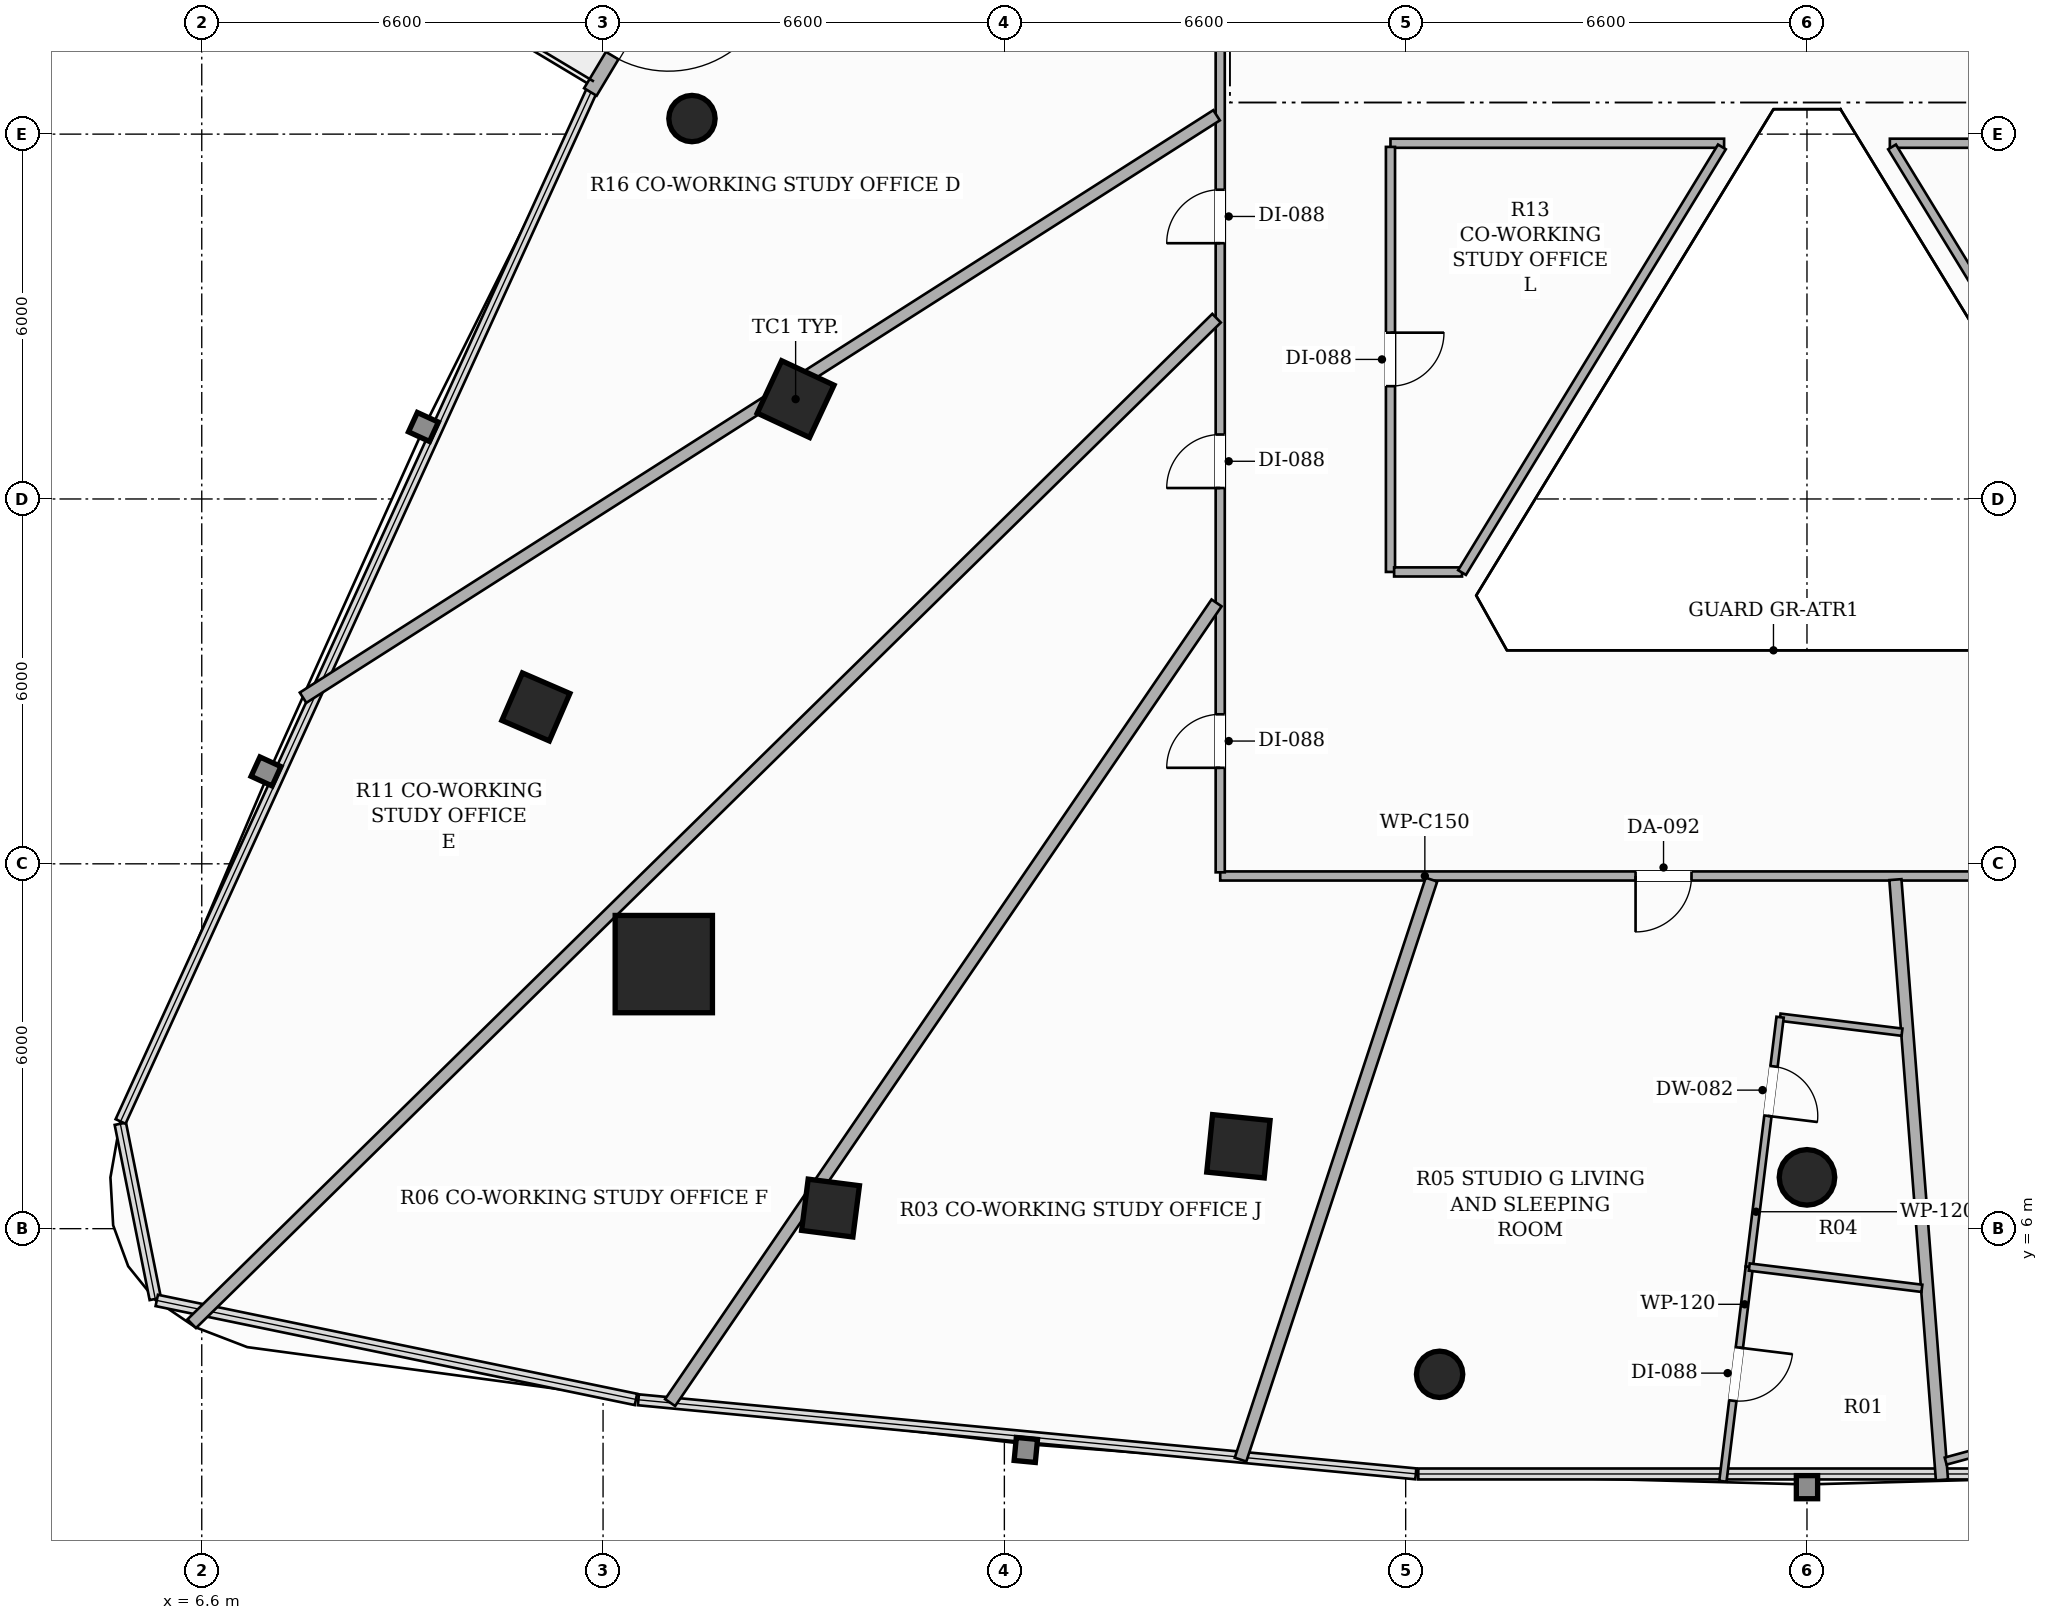
"""IFC4 building model, lengths in metres.
Left out: names, types, materials, properties, quantities, classifications, styles, units other than length and angle.
Written with IfcOpenShell. Run it as: python <this file> out.ifc"""

import sys

from ifc_helpers import new_model, si_unit, direction, frame, frame_2d, origin, origin_2d, place, context, subcontext, project, spatial, rectangle, hollow_rectangle, hollow_circle, extrude, element, fill, save


model = new_model("IFC4")
c1 = context("Model", 3, precision=1e-05, world=origin(), true_north=direction((0.0, 1.0)))
c2 = subcontext(c1, "Body", "Model", "MODEL_VIEW")
j1 = project(units=[si_unit("LENGTHUNIT", "METRE"), si_unit("PLANEANGLEUNIT", "RADIAN")], contexts=[c1])
p1 = place(None, origin())
s1 = spatial("IfcSite", under=j1, at=p1, CompositionType="ELEMENT")
p2 = place(p1, origin())
s2 = spatial("IfcBuilding", under=s1, at=p2, CompositionType="ELEMENT")
p3 = place(p2, frame((0.0, 0.0, 70.85)))
s3 = spatial("IfcBuildingStorey", under=s2, at=p3, CompositionType="ELEMENT", Elevation=70.85)
p4 = place(p3, frame((14.199, 10.351, 0.0), z_axis=(0.0, 0.0, 1.0), x_axis=(1.0, 0.0, 0.0)))
e1 = element("IfcColumn", 1, at=p4, inside=s3, PredefinedType="COLUMN", context=c2, shape_type="SweptSolid", body=[
    extrude(hollow_rectangle(XDim=1.6, YDim=1.6, WallThickness=0.05, at=origin_2d()), origin(), (0.0, 0.0, 1.0), 3.3),
])
for number, where, z_axis, x_axis in (
    (2, (16.367, 19.642, 0.0), (0.0, 0.0, 1.0), (0.423, 0.906, 0.0)),
    (3, (23.649, 7.355, 0.0), (0.0, 0.0, 1.0), (-0.995, 0.101, 0.0)),
):
    element("IfcColumn", number, at=place(p3, frame(where, z_axis=z_axis, x_axis=x_axis)), inside=s3, PredefinedType="COLUMN", context=c2, shape_type="SweptSolid", body=[
        extrude(hollow_rectangle(XDim=0.95, YDim=0.95, WallThickness=0.032, at=origin_2d()), origin(), (0.0, 0.0, 1.0), 3.3),
    ])
p5 = place(p3, frame((33.0, 6.844, 0.0), z_axis=(0.0, 0.0, 1.0), x_axis=(1.0, 0.0, 0.0)))
e4 = element("IfcColumn", 4, at=p5, inside=s3, PredefinedType="COLUMN", context=c2, shape_type="SweptSolid", body=[
    extrude(hollow_circle(Radius=0.457, WallThickness=0.025, at=origin_2d()), origin(), (0.0, 0.0, 1.0), 3.3),
])
for number, where, z_axis, x_axis in (
    (5, (12.095, 14.58, 0.0), (0.0, 0.0, 1.0), (0.397, 0.918, 0.0)),
    (6, (16.941, 6.339, 0.0), (0.0, 0.0, 1.0), (-0.992, 0.127, 0.0)),
):
    element("IfcColumn", number, at=place(p3, frame(where, z_axis=z_axis, x_axis=x_axis)), inside=s3, PredefinedType="COLUMN", context=c2, shape_type="SweptSolid", body=[
        extrude(hollow_rectangle(XDim=0.85, YDim=0.85, WallThickness=0.028, at=origin_2d()), origin(), (0.0, 0.0, 1.0), 3.3),
    ])
for number, where, z_axis, x_axis in (
    (7, (14.662, 24.256, 0.0), (0.0, 0.0, 1.0), (1.0, 0.0, 0.0)),
    (8, (26.958, 3.605, 0.0), (0.0, 0.0, 1.0), (1.0, 0.0, 0.0)),
):
    element("IfcColumn", number, at=place(p3, frame(where, z_axis=z_axis, x_axis=x_axis)), inside=s3, PredefinedType="COLUMN", context=c2, shape_type="SweptSolid", body=[
        extrude(hollow_circle(Radius=0.381, WallThickness=0.022, at=origin_2d()), origin(), (0.0, 0.0, 1.0), 3.3),
    ])
p6 = place(p3, frame((19.473, 35.501, 0.0), z_axis=(0.0, 0.0, 1.0), x_axis=(-0.514333361126, -0.857590341382, 0.0)))
e9 = element("IfcWall", 9, at=p6, inside=s3, PredefinedType="SOLIDWALL", context=c2, shape_type="SweptSolid", body=[
    extrude(rectangle(XDim=12.603, YDim=0.24, at=frame_2d((6.301, 0.0))), origin(), (0.0, 0.0, 1.0), 2.624),
])
p7 = place(p6, frame((10.105, 0.0, 0.0)))
e10 = element("IfcOpeningElement", 10, at=p7, cuts=e9, PredefinedType="OPENING", context=c2, shape_type="SweptSolid", body=[
    extrude(rectangle(XDim=1.8, YDim=2.2, at=frame_2d((0.9, 1.1))), frame((0.0, 0.13, 0.0), z_axis=(0.0, -1.0, 0.0), x_axis=(1.0, 0.0, 0.0)), (0.0, 0.0, 1.0), 0.26),
])
p8 = place(p3, frame((42.59, 11.8, 0.0), z_axis=(0.0, 0.0, 1.0), x_axis=(-1.0, 0.0, 0.0)))
e11 = element("IfcWall", 11, at=p8, inside=s3, PredefinedType="PARTITIONING", context=c2, shape_type="SweptSolid", body=[
    extrude(rectangle(XDim=19.24, YDim=0.15, at=frame_2d((9.62, 0.0))), origin(), (0.0, 0.0, 1.0), 2.669),
])
p9 = place(p8, frame((11.489, 0.0, 0.0)))
e12 = element("IfcOpeningElement", 12, at=p9, cuts=e11, PredefinedType="OPENING", context=c2, shape_type="SweptSolid", body=[
    extrude(rectangle(XDim=0.92, YDim=2.15, at=frame_2d((0.46, 1.075))), frame((0.0, 0.085, 0.0), z_axis=(0.0, -1.0, 0.0), x_axis=(1.0, 0.0, 0.0)), (0.0, 0.0, 1.0), 0.17),
])
p10 = place(p8, frame((3.787, 0.0, 0.0)))
e13 = element("IfcOpeningElement", 13, at=p10, cuts=e11, PredefinedType="OPENING", context=c2, shape_type="SweptSolid", body=[
    extrude(rectangle(XDim=0.92, YDim=2.15, at=frame_2d((0.46, 1.075))), frame((0.0, 0.085, 0.0), z_axis=(0.0, -1.0, 0.0), x_axis=(1.0, 0.0, 0.0)), (0.0, 0.0, 1.0), 0.17),
])
p11 = place(p3, frame((23.35, 11.86, 0.0), z_axis=(0.0, 0.0, 1.0), x_axis=(0.0, 1.0, 0.0)))
e14 = element("IfcWall", 14, at=p11, inside=s3, PredefinedType="PARTITIONING", context=c2, shape_type="SweptSolid", body=[
    extrude(rectangle(XDim=25.04, YDim=0.15, at=frame_2d((12.52, 0.0))), origin(), (0.0, 0.0, 1.0), 2.413),
])
p12 = place(p11, frame((18.154, 0.0, 0.0)))
e15 = element("IfcOpeningElement", 15, at=p12, cuts=e14, PredefinedType="OPENING", context=c2, shape_type="SweptSolid", body=[
    extrude(rectangle(XDim=0.88, YDim=2.1, at=frame_2d((0.44, 1.05))), frame((0.0, 0.085, 0.0), z_axis=(0.0, -1.0, 0.0), x_axis=(1.0, 0.0, 0.0)), (0.0, 0.0, 1.0), 0.17),
])
p13 = place(p11, frame((10.346, 0.0, 0.0)))
e16 = element("IfcOpeningElement", 16, at=p13, cuts=e14, PredefinedType="OPENING", context=c2, shape_type="SweptSolid", body=[
    extrude(rectangle(XDim=0.88, YDim=2.1, at=frame_2d((0.44, 1.05))), frame((0.0, 0.085, 0.0), z_axis=(0.0, -1.0, 0.0), x_axis=(1.0, 0.0, 0.0)), (0.0, 0.0, 1.0), 0.17),
])
p14 = place(p11, frame((6.32, 0.0, 0.0)))
e17 = element("IfcOpeningElement", 17, at=p14, cuts=e14, PredefinedType="OPENING", context=c2, shape_type="SweptSolid", body=[
    extrude(rectangle(XDim=0.88, YDim=2.1, at=frame_2d((0.44, 1.05))), frame((0.0, 0.085, 0.0), z_axis=(0.0, -1.0, 0.0), x_axis=(1.0, 0.0, 0.0)), (0.0, 0.0, 1.0), 0.17),
])
p15 = place(p11, frame((1.719, 0.0, 0.0)))
e18 = element("IfcOpeningElement", 18, at=p15, cuts=e14, PredefinedType="OPENING", context=c2, shape_type="SweptSolid", body=[
    extrude(rectangle(XDim=0.88, YDim=2.1, at=frame_2d((0.44, 1.05))), frame((0.0, 0.085, 0.0), z_axis=(0.0, -1.0, 0.0), x_axis=(1.0, 0.0, 0.0)), (0.0, 0.0, 1.0), 0.17),
])
p16 = place(p3, frame((31.637, 23.85, 0.0), z_axis=(0.0, 0.0, 1.0), x_axis=(-1.0, 0.0, 0.0)))
e19 = element("IfcWall", 19, at=p16, inside=s3, PredefinedType="PARTITIONING", context=c2, shape_type="SweptSolid", body=[
    extrude(rectangle(XDim=5.487, YDim=0.15, at=frame_2d((2.744, 0.0))), origin(), (0.0, 0.0, 1.0), 2.669),
])
p17 = place(p3, frame((26.15, 23.79, 0.0), z_axis=(0.0, 0.0, 1.0), x_axis=(0.0, -1.0, 0.0)))
e20 = element("IfcWall", 20, at=p17, inside=s3, PredefinedType="PARTITIONING", context=c2, shape_type="SweptSolid", body=[
    extrude(rectangle(XDim=6.99, YDim=0.15, at=frame_2d((3.495, 0.0))), origin(), (0.0, 0.0, 1.0), 2.669),
])
p18 = place(p17, frame((3.055, 0.0, 0.0)))
e21 = element("IfcOpeningElement", 21, at=p18, cuts=e20, PredefinedType="OPENING", context=c2, shape_type="SweptSolid", body=[
    extrude(rectangle(XDim=0.88, YDim=2.1, at=frame_2d((0.44, 1.05))), frame((0.0, 0.085, 0.0), z_axis=(0.0, -1.0, 0.0), x_axis=(1.0, 0.0, 0.0)), (0.0, 0.0, 1.0), 0.17),
])
p19 = place(p3, frame((26.21, 16.8, 0.0), z_axis=(0.0, 0.0, 1.0), x_axis=(1.0, 0.0, 0.0)))
e22 = element("IfcWall", 22, at=p19, inside=s3, PredefinedType="PARTITIONING", context=c2, shape_type="SweptSolid", body=[
    extrude(rectangle(XDim=1.117, YDim=0.15, at=frame_2d((0.559, 0.0))), origin(), (0.0, 0.0, 1.0), 3.06),
])
p20 = place(p3, frame((39.79, 23.85, 0.0), z_axis=(0.0, 0.0, 1.0), x_axis=(-1.0, 0.0, 0.0)))
e23 = element("IfcWall", 23, at=p20, inside=s3, PredefinedType="PARTITIONING", context=c2, shape_type="SweptSolid", body=[
    extrude(rectangle(XDim=5.427, YDim=0.15, at=frame_2d((2.713, 0.0))), origin(), (0.0, 0.0, 1.0), 2.669),
])
p21 = place(p3, frame((27.327, 16.79, 0.0), z_axis=(0.0, 0.0, 1.0), x_axis=(0.521129693902, 0.853477499489, 0.0)))
e24 = element("IfcWall", 24, at=p21, inside=s3, PredefinedType="PARTITIONING", context=c2, shape_type="SweptSolid", body=[
    extrude(rectangle(XDim=8.202, YDim=0.15, at=frame_2d((4.101, 0.0))), origin(), (0.0, 0.0, 1.0), 2.669),
])
p22 = place(p3, frame((34.399, 23.79, 0.0), z_axis=(0.0, 0.0, 1.0), x_axis=(0.521619930676, -0.853177969665, 0.0)))
e25 = element("IfcWall", 25, at=p22, inside=s3, PredefinedType="PARTITIONING", context=c2, shape_type="SweptSolid", body=[
    extrude(rectangle(XDim=8.194, YDim=0.15, at=frame_2d((4.097, 0.0))), origin(), (0.0, 0.0, 1.0), 2.669),
])
p23 = place(p3, frame((23.29, 24.31, 0.0), z_axis=(0.0, 0.0, 1.0), x_axis=(-0.843217726059, -0.537572196509, 0.0)))
e26 = element("IfcWall", 26, at=p23, inside=s3, PredefinedType="PARTITIONING", context=c2, shape_type="SweptSolid", body=[
    extrude(rectangle(XDim=17.817, YDim=0.2, at=frame_2d((8.909, 0.0))), origin(), (0.0, 0.0, 1.0), 2.413),
])
p24 = place(p3, frame((23.29, 20.973, 0.0), z_axis=(0.0, 0.0, 1.0), x_axis=(-0.713831483248, -0.70031750908, 0.0)))
e27 = element("IfcWall", 27, at=p24, inside=s3, PredefinedType="PARTITIONING", context=c2, shape_type="SweptSolid", body=[
    extrude(rectangle(XDim=23.612, YDim=0.2, at=frame_2d((11.806, 0.0))), origin(), (0.0, 0.0, 1.0), 2.413),
])
p25 = place(p3, frame((23.29, 16.291, 0.0), z_axis=(0.0, 0.0, 1.0), x_axis=(-0.564210182678, -0.825631194761, 0.0)))
e28 = element("IfcWall", 28, at=p25, inside=s3, PredefinedType="PARTITIONING", context=c2, shape_type="SweptSolid", body=[
    extrude(rectangle(XDim=15.928, YDim=0.2, at=frame_2d((7.964, 0.0))), origin(), (0.0, 0.0, 1.0), 2.413),
])
p26 = place(p3, frame((34.454, 11.74, 0.0), z_axis=(0.0, 0.0, 1.0), x_axis=(0.077354581403, -0.997003645297, 0.0)))
e29 = element("IfcWall", 29, at=p26, inside=s3, PredefinedType="PARTITIONING", context=c2, shape_type="SweptSolid", body=[
    extrude(rectangle(XDim=9.901, YDim=0.2, at=frame_2d((4.95, 0.0))), origin(), (0.0, 0.0, 1.0), 2.413),
])
p27 = place(p3, frame((23.684, 2.202, 0.0), z_axis=(0.0, 0.0, 1.0), x_axis=(0.31268804242, 0.949855877556, 0.0)))
e30 = element("IfcWall", 30, at=p27, inside=s3, PredefinedType="PARTITIONING", context=c2, shape_type="SweptSolid", body=[
    extrude(rectangle(XDim=10.042, YDim=0.2, at=frame_2d((5.021, 0.0))), origin(), (0.0, 0.0, 1.0), 2.413),
])
p28 = place(p3, frame((34.563, 9.231, 0.0), z_axis=(0.0, 0.0, 1.0), x_axis=(-0.992492062854, 0.122309055968, 0.0)))
e31 = element("IfcWall", 31, at=p28, inside=s3, PredefinedType="PARTITIONING", context=c2, shape_type="SweptSolid", body=[
    extrude(rectangle(XDim=2.02, YDim=0.12, at=frame_2d((1.01, 0.0))), origin(), (0.0, 0.0, 1.0), 2.669),
])
p29 = place(p3, frame((32.558, 9.478, 0.0), z_axis=(0.0, 0.0, 1.0), x_axis=(-0.122474226657, -0.992471694208, 0.0)))
e32 = element("IfcWall", 32, at=p29, inside=s3, PredefinedType="PARTITIONING", context=c2, shape_type="SweptSolid", body=[
    extrude(rectangle(XDim=4.14, YDim=0.12, at=frame_2d((2.07, 0.0))), origin(), (0.0, 0.0, 1.0), 2.413),
])
p30 = place(p29, frame((0.816, 0.0, 0.0)))
e33 = element("IfcOpeningElement", 33, at=p30, cuts=e32, PredefinedType="OPENING", context=c2, shape_type="SweptSolid", body=[
    extrude(rectangle(XDim=0.82, YDim=2.1, at=frame_2d((0.41, 1.05))), frame((0.0, 0.07, 0.0), z_axis=(0.0, -1.0, 0.0), x_axis=(1.0, 0.0, 0.0)), (0.0, 0.0, 1.0), 0.14),
])
p31 = place(p3, frame((32.051, 5.369, 0.0), z_axis=(0.0, 0.0, 1.0), x_axis=(-0.122290707402, -0.992494323854, 0.0)))
e34 = element("IfcWall", 34, at=p31, inside=s3, PredefinedType="PARTITIONING", context=c2, shape_type="SweptSolid", body=[
    extrude(rectangle(XDim=3.55, YDim=0.12, at=frame_2d((1.775, 0.0))), origin(), (0.0, 0.0, 1.0), 3.06),
])
p32 = place(p31, frame((1.335, 0.0, 0.0)))
e35 = element("IfcOpeningElement", 35, at=p32, cuts=e34, PredefinedType="OPENING", context=c2, shape_type="SweptSolid", body=[
    extrude(rectangle(XDim=0.88, YDim=2.1, at=frame_2d((0.44, 1.05))), frame((0.0, 0.07, 0.0), z_axis=(0.0, -1.0, 0.0), x_axis=(1.0, 0.0, 0.0)), (0.0, 0.0, 1.0), 0.14),
])
p33 = place(p3, frame((34.89, 5.019, 0.0), z_axis=(0.0, 0.0, 1.0), x_axis=(-0.992491734807, 0.12231171792, 0.0)))
e36 = element("IfcWall", 36, at=p33, inside=s3, PredefinedType="PARTITIONING", context=c2, shape_type="SweptSolid", body=[
    extrude(rectangle(XDim=2.86, YDim=0.12, at=frame_2d((1.43, 0.0))), origin(), (0.0, 0.0, 1.0), 3.06),
])
p34 = place(p3, frame((42.655, 4.184, 0.0), z_axis=(0.0, 0.0, 1.0), x_axis=(-0.964929508567, -0.26250913031, 0.0)))
e37 = element("IfcWall", 37, at=p34, inside=s3, PredefinedType="PARTITIONING", context=c2, shape_type="SweptSolid", body=[
    extrude(rectangle(XDim=7.642, YDim=0.12, at=frame_2d((3.821, 0.0))), origin(), (0.0, 0.0, 1.0), 2.413),
])
p35 = place(p34, frame((4.368, 0.0, 0.0)))
e38 = element("IfcOpeningElement", 38, at=p35, cuts=e37, PredefinedType="OPENING", context=c2, shape_type="SweptSolid", body=[
    extrude(rectangle(XDim=0.88, YDim=2.1, at=frame_2d((0.44, 1.05))), frame((0.0, 0.07, 0.0), z_axis=(0.0, -1.0, 0.0), x_axis=(1.0, 0.0, 0.0)), (0.0, 0.0, 1.0), 0.14),
])
p36 = place(p7, origin())
e39 = element("IfcDoor", 39, at=p36, inside=s3, OperationType="SINGLE_SWING_LEFT", PredefinedType="DOOR", context=c2, shape_type="SweptSolid", body=[
    extrude(rectangle(XDim=1.8, YDim=2.2, at=frame_2d((0.9, 1.1))), frame((0.0, 0.025, 0.0), z_axis=(0.0, -1.0, 0.0), x_axis=(1.0, 0.0, 0.0)), (0.0, 0.0, 1.0), 0.05),
])
fill(e10, e39)
p37 = place(p13, origin())
e40 = element("IfcDoor", 40, at=p37, inside=s3, OperationType="SINGLE_SWING_LEFT", PredefinedType="DOOR", context=c2, shape_type="SweptSolid", body=[
    extrude(rectangle(XDim=0.88, YDim=2.1, at=frame_2d((0.44, 1.05))), frame((0.0, 0.025, 0.0), z_axis=(0.0, -1.0, 0.0), x_axis=(1.0, 0.0, 0.0)), (0.0, 0.0, 1.0), 0.05),
])
fill(e16, e40)
p38 = place(p14, origin())
e41 = element("IfcDoor", 41, at=p38, inside=s3, OperationType="SINGLE_SWING_LEFT", PredefinedType="DOOR", context=c2, shape_type="SweptSolid", body=[
    extrude(rectangle(XDim=0.88, YDim=2.1, at=frame_2d((0.44, 1.05))), frame((0.0, 0.025, 0.0), z_axis=(0.0, -1.0, 0.0), x_axis=(1.0, 0.0, 0.0)), (0.0, 0.0, 1.0), 0.05),
])
fill(e17, e41)
p39 = place(p9, origin())
e42 = element("IfcDoor", 42, at=p39, inside=s3, OperationType="SINGLE_SWING_RIGHT", PredefinedType="DOOR", context=c2, shape_type="SweptSolid", body=[
    extrude(rectangle(XDim=0.92, YDim=2.15, at=frame_2d((0.46, 1.075))), frame((0.0, 0.025, 0.0), z_axis=(0.0, -1.0, 0.0), x_axis=(1.0, 0.0, 0.0)), (0.0, 0.0, 1.0), 0.05),
])
fill(e12, e42)
p40 = place(p30, origin())
e43 = element("IfcDoor", 43, at=p40, inside=s3, OperationType="SINGLE_SWING_RIGHT", PredefinedType="DOOR", context=c2, shape_type="SweptSolid", body=[
    extrude(rectangle(XDim=0.82, YDim=2.1, at=frame_2d((0.41, 1.05))), frame((0.0, 0.025, 0.0), z_axis=(0.0, -1.0, 0.0), x_axis=(1.0, 0.0, 0.0)), (0.0, 0.0, 1.0), 0.05),
])
fill(e33, e43)
p41 = place(p32, origin())
e44 = element("IfcDoor", 44, at=p41, inside=s3, OperationType="SINGLE_SWING_LEFT", PredefinedType="DOOR", context=c2, shape_type="SweptSolid", body=[
    extrude(rectangle(XDim=0.88, YDim=2.1, at=frame_2d((0.44, 1.05))), frame((0.0, 0.025, 0.0), z_axis=(0.0, -1.0, 0.0), x_axis=(1.0, 0.0, 0.0)), (0.0, 0.0, 1.0), 0.05),
])
fill(e35, e44)
p42 = place(p15, origin())
e45 = element("IfcDoor", 45, at=p42, inside=s3, OperationType="SINGLE_SWING_LEFT", PredefinedType="DOOR", context=c2, shape_type="SweptSolid", body=[
    extrude(rectangle(XDim=0.88, YDim=2.1, at=frame_2d((0.44, 1.05))), frame((0.0, 0.025, 0.0), z_axis=(0.0, -1.0, 0.0), x_axis=(1.0, 0.0, 0.0)), (0.0, 0.0, 1.0), 0.05),
])
fill(e18, e45)
p43 = place(p18, origin())
e46 = element("IfcDoor", 46, at=p43, inside=s3, OperationType="SINGLE_SWING_LEFT", PredefinedType="DOOR", context=c2, shape_type="SweptSolid", body=[
    extrude(rectangle(XDim=0.88, YDim=2.1, at=frame_2d((0.44, 1.05))), frame((0.0, 0.025, 0.0), z_axis=(0.0, -1.0, 0.0), x_axis=(1.0, 0.0, 0.0)), (0.0, 0.0, 1.0), 0.05),
])
fill(e21, e46)
save(model, sys.argv[1])
